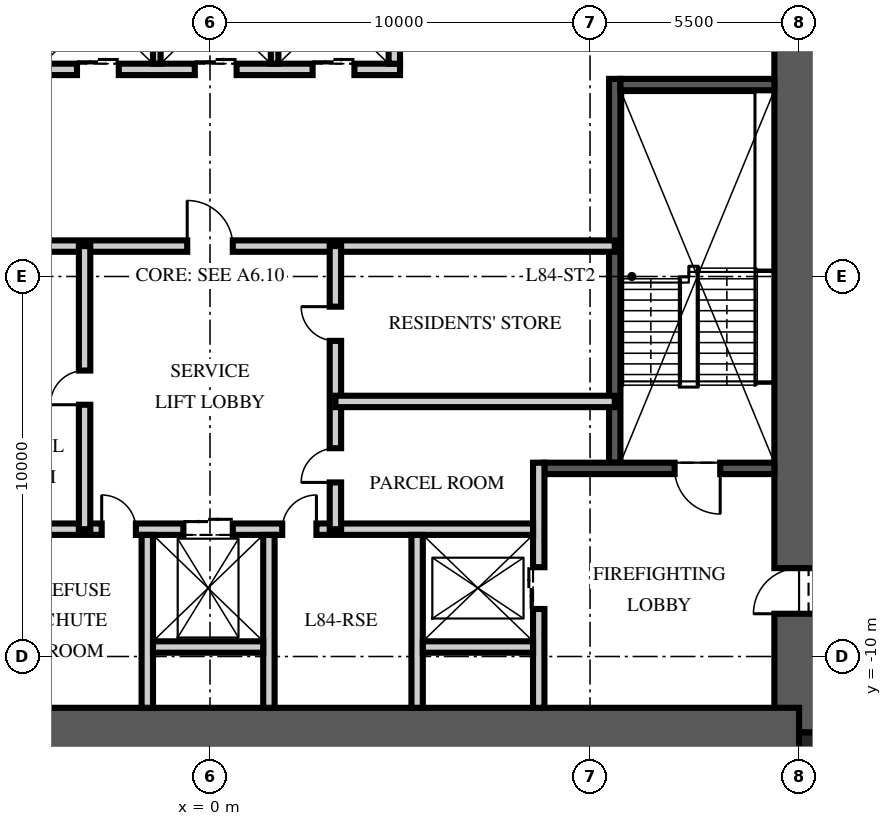
"""IFC4 building model, lengths in metres.
Left out: names, types, materials, properties, quantities, classifications, styles, units other than length and angle.
Written with IfcOpenShell. Run it as: python <this file> out.ifc"""

import sys

from ifc_helpers import new_model, si_unit, direction, frame, frame_2d, origin, origin_2d, place, context, subcontext, project, spatial, rectangle, extrude, element, fill, save


model = new_model("IFC4")
c1 = context("Model", 3, precision=1e-05, world=origin(), true_north=direction((0.0, 1.0)))
c2 = subcontext(c1, "Body", "Model", "MODEL_VIEW")
j1 = project(units=[si_unit("LENGTHUNIT", "METRE"), si_unit("PLANEANGLEUNIT", "RADIAN")], contexts=[c1])
p1 = place(None, origin())
s1 = spatial("IfcSite", under=j1, at=p1, CompositionType="ELEMENT")
p2 = place(p1, origin())
s2 = spatial("IfcBuilding", under=s1, at=p2, CompositionType="ELEMENT")
p3 = place(p2, frame((0.0, 0.0, 334.5)))
s3 = spatial("IfcBuildingStorey", under=s2, at=p3, CompositionType="ELEMENT", Elevation=334.5)
p4 = place(p3, frame((15.5, -12.0, -0.25), z_axis=(0.0, 0.0, 1.0), x_axis=(0.0, 1.0, 0.0)))
e1 = element("IfcWall", 1, at=p4, inside=s3, PredefinedType="SHEAR", context=c2, shape_type="SweptSolid", body=[
    extrude(rectangle(XDim=24.0, YDim=1.3, at=frame_2d((12.0, 0.0))), origin(), (0.0, 0.0, 1.0), 3.75),
])
p5 = place(p4, frame((3.125, 0.0, 0.25)))
e2 = element("IfcOpeningElement", 2, at=p5, cuts=e1, PredefinedType="OPENING", context=c2, shape_type="SweptSolid", body=[
    extrude(rectangle(XDim=1.2, YDim=2.1, at=frame_2d((0.6, 1.05))), frame((0.0, 0.66, 0.0), z_axis=(0.0, -1.0, 0.0), x_axis=(1.0, 0.0, 0.0)), (0.0, 0.0, 1.0), 1.32),
])
p6 = place(p4, frame((19.375, 0.0, 0.25)))
e3 = element("IfcOpeningElement", 3, at=p6, cuts=e1, PredefinedType="OPENING", context=c2, shape_type="SweptSolid", body=[
    extrude(rectangle(XDim=1.8, YDim=2.1, at=frame_2d((0.9, 1.05))), frame((0.0, 0.66, 0.0), z_axis=(0.0, -1.0, 0.0), x_axis=(1.0, 0.0, 0.0)), (0.0, 0.0, 1.0), 1.32),
])
p7 = place(p3, frame((-15.5, -12.0, -0.25), z_axis=(0.0, 0.0, 1.0), x_axis=(1.0, 0.0, 0.0)))
e4 = element("IfcWall", 4, at=p7, inside=s3, PredefinedType="SHEAR", context=c2, shape_type="SweptSolid", body=[
    extrude(rectangle(XDim=31.0, YDim=1.3, at=frame_2d((15.5, 0.0))), origin(), (0.0, 0.0, 1.0), 3.75),
])
p8 = place(p3, frame((15.825, -12.325, -0.25), z_axis=(0.0, 0.0, 1.0), x_axis=(1.0, 0.0, 0.0)))
e5 = element("IfcColumn", 5, at=p8, inside=s3, PredefinedType="COLUMN", context=c2, shape_type="SweptSolid", body=[
    extrude(rectangle(XDim=0.65, YDim=0.65, at=origin_2d()), origin(), (0.0, 0.0, 1.0), 3.75),
])
p9 = place(p3, frame((10.65, -4.9, 0.0), z_axis=(0.0, 0.0, 1.0), x_axis=(0.0, 1.0, 0.0)))
e6 = element("IfcWall", 6, at=p9, inside=s3, PredefinedType="SOLIDWALL", context=c2, shape_type="SweptSolid", body=[
    extrude(rectangle(XDim=10.1, YDim=0.3, at=frame_2d((5.05, 0.0))), origin(), (0.0, 0.0, 1.0), 3.5),
])
p10 = place(p3, frame((14.85, -5.05, 0.0), z_axis=(0.0, 0.0, 1.0), x_axis=(-1.0, 0.0, 0.0)))
e7 = element("IfcWall", 7, at=p10, inside=s3, PredefinedType="SOLIDWALL", context=c2, shape_type="SweptSolid", body=[
    extrude(rectangle(XDim=6.05, YDim=0.3, at=frame_2d((3.025, 0.0))), origin(), (0.0, 0.0, 1.0), 3.5),
])
p11 = place(p10, frame((1.425, 0.0, 0.0)))
e8 = element("IfcOpeningElement", 8, at=p11, cuts=e7, PredefinedType="OPENING", context=c2, shape_type="SweptSolid", body=[
    extrude(rectangle(XDim=1.2, YDim=2.1, at=frame_2d((0.6, 1.05))), frame((0.0, 0.16, 0.0), z_axis=(0.0, -1.0, 0.0), x_axis=(1.0, 0.0, 0.0)), (0.0, 0.0, 1.0), 0.32),
])
p12 = place(p3, frame((14.85, 5.05, 0.0), z_axis=(0.0, 0.0, 1.0), x_axis=(-1.0, 0.0, 0.0)))
e9 = element("IfcWall", 9, at=p12, inside=s3, PredefinedType="SOLIDWALL", context=c2, shape_type="SweptSolid", body=[
    extrude(rectangle(XDim=4.05, YDim=0.3, at=frame_2d((2.025, 0.0))), origin(), (0.0, 0.0, 1.0), 3.5),
])
p13 = place(p3, frame((8.65, -11.35, 0.0), z_axis=(0.0, 0.0, 1.0), x_axis=(0.0, 1.0, 0.0)))
e10 = element("IfcWall", 10, at=p13, inside=s3, PredefinedType="PARTITIONING", context=c2, shape_type="SweptSolid", body=[
    extrude(rectangle(XDim=6.45, YDim=0.3, at=frame_2d((3.225, 0.0))), origin(), (0.0, 0.0, 1.0), 3.5),
])
p14 = place(p13, frame((2.6, 0.0, 0.0)))
e11 = element("IfcOpeningElement", 11, at=p14, cuts=e10, PredefinedType="OPENING", context=c2, shape_type="SweptSolid", body=[
    extrude(rectangle(XDim=1.1, YDim=2.1, at=frame_2d((0.55, 1.05))), frame((0.0, 0.16, 0.0), z_axis=(0.0, -1.0, 0.0), x_axis=(1.0, 0.0, 0.0)), (0.0, 0.0, 1.0), 0.32),
])
p15 = place(p3, frame((-8.5, -6.65, 0.0), z_axis=(0.0, 0.0, 1.0), x_axis=(1.0, 0.0, 0.0)))
e12 = element("IfcWall", 12, at=p15, inside=s3, PredefinedType="PARTITIONING", context=c2, shape_type="SweptSolid", body=[
    extrude(rectangle(XDim=17.0, YDim=0.3, at=frame_2d((8.5, 0.0))), origin(), (0.0, 0.0, 1.0), 3.5),
])
p16 = place(p15, frame((7.8, 0.0, 0.0)))
e13 = element("IfcOpeningElement", 13, at=p16, cuts=e12, PredefinedType="OPENING", context=c2, shape_type="SweptSolid", body=[
    extrude(rectangle(XDim=1.3, YDim=2.4, at=frame_2d((0.65, 1.2))), frame((0.0, 0.16, 0.0), z_axis=(0.0, -1.0, 0.0), x_axis=(1.0, 0.0, 0.0)), (0.0, 0.0, 1.0), 0.32),
])
p17 = place(p15, frame((5.65, 0.0, 0.0)))
e14 = element("IfcOpeningElement", 14, at=p17, cuts=e12, PredefinedType="OPENING", context=c2, shape_type="SweptSolid", body=[
    extrude(rectangle(XDim=0.9, YDim=2.1, at=frame_2d((0.45, 1.05))), frame((0.0, 0.16, 0.0), z_axis=(0.0, -1.0, 0.0), x_axis=(1.0, 0.0, 0.0)), (0.0, 0.0, 1.0), 0.32),
])
p18 = place(p15, frame((10.4, 0.0, 0.0)))
e15 = element("IfcOpeningElement", 15, at=p18, cuts=e12, PredefinedType="OPENING", context=c2, shape_type="SweptSolid", body=[
    extrude(rectangle(XDim=0.9, YDim=2.1, at=frame_2d((0.45, 1.05))), frame((0.0, 0.16, 0.0), z_axis=(0.0, -1.0, 0.0), x_axis=(1.0, 0.0, 0.0)), (0.0, 0.0, 1.0), 0.32),
])
for number, where, z_axis, x_axis in (
    (16, (-1.65, -11.35, 0.0), (0.0, 0.0, 1.0), (0.0, 1.0, 0.0)),
    (17, (1.55, -11.35, 0.0), (0.0, 0.0, 1.0), (0.0, 1.0, 0.0)),
    (18, (5.45, -11.35, 0.0), (0.0, 0.0, 1.0), (0.0, 1.0, 0.0)),
):
    element("IfcWall", number, at=place(p3, frame(where, z_axis=z_axis, x_axis=x_axis)), inside=s3, PredefinedType="PARTITIONING", context=c2, shape_type="SweptSolid", body=[
        extrude(rectangle(XDim=4.55, YDim=0.3, at=frame_2d((2.275, 0.0))), origin(), (0.0, 0.0, 1.0), 3.5),
    ])
for number, where, z_axis, x_axis in (
    (19, (-1.5, -9.75, 0.0), (0.0, 0.0, 1.0), (1.0, 0.0, 0.0)),
    (20, (5.6, -9.75, 0.0), (0.0, 0.0, 1.0), (1.0, 0.0, 0.0)),
):
    element("IfcWall", number, at=place(p3, frame(where, z_axis=z_axis, x_axis=x_axis)), inside=s3, PredefinedType="PARTITIONING", context=c2, shape_type="SweptSolid", body=[
        extrude(rectangle(XDim=2.9, YDim=0.3, at=frame_2d((1.45, 0.0))), origin(), (0.0, 0.0, 1.0), 3.5),
    ])
p19 = place(p3, frame((-4.7, 5.45, 0.0), z_axis=(0.0, 0.0, 1.0), x_axis=(1.0, 0.0, 0.0)))
e21 = element("IfcWall", 21, at=p19, inside=s3, PredefinedType="PARTITIONING", context=c2, shape_type="SweptSolid", body=[
    extrude(rectangle(XDim=9.7, YDim=0.3, at=frame_2d((4.85, 0.0))), origin(), (0.0, 0.0, 1.0), 3.5),
])
p20 = place(p19, frame((1.2, 0.0, 0.0)))
e22 = element("IfcOpeningElement", 22, at=p20, cuts=e21, PredefinedType="OPENING", context=c2, shape_type="SweptSolid", body=[
    extrude(rectangle(XDim=1.1, YDim=2.1, at=frame_2d((0.55, 1.05))), frame((0.0, 0.16, 0.0), z_axis=(0.0, -1.0, 0.0), x_axis=(1.0, 0.0, 0.0)), (0.0, 0.0, 1.0), 0.32),
])
p21 = place(p19, frame((4.3, 0.0, 0.0)))
e23 = element("IfcOpeningElement", 23, at=p21, cuts=e21, PredefinedType="OPENING", context=c2, shape_type="SweptSolid", body=[
    extrude(rectangle(XDim=1.1, YDim=2.1, at=frame_2d((0.55, 1.05))), frame((0.0, 0.16, 0.0), z_axis=(0.0, -1.0, 0.0), x_axis=(1.0, 0.0, 0.0)), (0.0, 0.0, 1.0), 0.32),
])
p22 = place(p19, frame((7.4, 0.0, 0.0)))
e24 = element("IfcOpeningElement", 24, at=p22, cuts=e21, PredefinedType="OPENING", context=c2, shape_type="SweptSolid", body=[
    extrude(rectangle(XDim=1.1, YDim=2.1, at=frame_2d((0.55, 1.05))), frame((0.0, 0.16, 0.0), z_axis=(0.0, -1.0, 0.0), x_axis=(1.0, 0.0, 0.0)), (0.0, 0.0, 1.0), 0.32),
])
p23 = place(p3, frame((4.85, 5.6, 0.0), z_axis=(0.0, 0.0, 1.0), x_axis=(0.0, 1.0, 0.0)))
e25 = element("IfcWall", 25, at=p23, inside=s3, PredefinedType="PARTITIONING", context=c2, shape_type="SweptSolid", body=[
    extrude(rectangle(XDim=2.8, YDim=0.3, at=frame_2d((1.4, 0.0))), origin(), (0.0, 0.0, 1.0), 3.5),
])
for number, where, z_axis, x_axis in (
    (26, (-1.4, 5.6, 0.0), (0.0, 0.0, 1.0), (0.0, 1.0, 0.0)),
    (27, (1.7, 5.6, 0.0), (0.0, 0.0, 1.0), (0.0, 1.0, 0.0)),
):
    element("IfcWall", number, at=place(p3, frame(where, z_axis=z_axis, x_axis=x_axis)), inside=s3, PredefinedType="PARTITIONING", context=c2, shape_type="SweptSolid", body=[
        extrude(rectangle(XDim=2.8, YDim=0.2, at=frame_2d((1.4, 0.0))), origin(), (0.0, 0.0, 1.0), 3.5),
    ])
p24 = place(p3, frame((-10.65, 0.8, 0.0), z_axis=(0.0, 0.0, 1.0), x_axis=(1.0, 0.0, 0.0)))
e28 = element("IfcWall", 28, at=p24, inside=s3, PredefinedType="PARTITIONING", context=c2, shape_type="SweptSolid", body=[
    extrude(rectangle(XDim=21.3, YDim=0.3, at=frame_2d((10.65, 0.0))), origin(), (0.0, 0.0, 1.0), 3.5),
])
p25 = place(p24, frame((10.05, 0.0, 0.0)))
e29 = element("IfcOpeningElement", 29, at=p25, cuts=e28, PredefinedType="OPENING", context=c2, shape_type="SweptSolid", body=[
    extrude(rectangle(XDim=1.2, YDim=2.1, at=frame_2d((0.6, 1.05))), frame((0.0, 0.16, 0.0), z_axis=(0.0, -1.0, 0.0), x_axis=(1.0, 0.0, 0.0)), (0.0, 0.0, 1.0), 0.32),
])
p26 = place(p24, frame((1.74, 0.0, 0.0)))
e30 = element("IfcOpeningElement", 30, at=p26, cuts=e28, PredefinedType="OPENING", context=c2, shape_type="SweptSolid", body=[
    extrude(rectangle(XDim=0.9, YDim=2.1, at=frame_2d((0.45, 1.05))), frame((0.0, 0.16, 0.0), z_axis=(0.0, -1.0, 0.0), x_axis=(1.0, 0.0, 0.0)), (0.0, 0.0, 1.0), 0.32),
])
p27 = place(p3, frame((-3.3, -6.65, 0.0), z_axis=(0.0, 0.0, 1.0), x_axis=(0.0, 1.0, 0.0)))
e31 = element("IfcWall", 31, at=p27, inside=s3, PredefinedType="PARTITIONING", context=c2, shape_type="SweptSolid", body=[
    extrude(rectangle(XDim=7.45, YDim=0.3, at=frame_2d((3.725, 0.0))), origin(), (0.0, 0.0, 1.0), 3.5),
])
p28 = place(p27, frame((3.275, 0.0, 0.0)))
e32 = element("IfcOpeningElement", 32, at=p28, cuts=e31, PredefinedType="OPENING", context=c2, shape_type="SweptSolid", body=[
    extrude(rectangle(XDim=0.9, YDim=2.1, at=frame_2d((0.45, 1.05))), frame((0.0, 0.16, 0.0), z_axis=(0.0, -1.0, 0.0), x_axis=(1.0, 0.0, 0.0)), (0.0, 0.0, 1.0), 0.32),
])
p29 = place(p3, frame((3.3, -6.65, 0.0), z_axis=(0.0, 0.0, 1.0), x_axis=(0.0, 1.0, 0.0)))
e33 = element("IfcWall", 33, at=p29, inside=s3, PredefinedType="PARTITIONING", context=c2, shape_type="SweptSolid", body=[
    extrude(rectangle(XDim=7.45, YDim=0.3, at=frame_2d((3.725, 0.0))), origin(), (0.0, 0.0, 1.0), 3.5),
])
p30 = place(p29, frame((1.231, 0.0, 0.0)))
e34 = element("IfcOpeningElement", 34, at=p30, cuts=e33, PredefinedType="OPENING", context=c2, shape_type="SweptSolid", body=[
    extrude(rectangle(XDim=0.9, YDim=2.1, at=frame_2d((0.45, 1.05))), frame((0.0, 0.16, 0.0), z_axis=(0.0, -1.0, 0.0), x_axis=(1.0, 0.0, 0.0)), (0.0, 0.0, 1.0), 0.32),
])
p31 = place(p29, frame((4.956, 0.0, 0.0)))
e35 = element("IfcOpeningElement", 35, at=p31, cuts=e33, PredefinedType="OPENING", context=c2, shape_type="SweptSolid", body=[
    extrude(rectangle(XDim=0.9, YDim=2.1, at=frame_2d((0.45, 1.05))), frame((0.0, 0.16, 0.0), z_axis=(0.0, -1.0, 0.0), x_axis=(1.0, 0.0, 0.0)), (0.0, 0.0, 1.0), 0.32),
])
p32 = place(p3, frame((10.65, -3.288, 0.0), z_axis=(0.0, 0.0, 1.0), x_axis=(-1.0, 0.0, 0.0)))
e36 = element("IfcWall", 36, at=p32, inside=s3, PredefinedType="PARTITIONING", context=c2, shape_type="SweptSolid", body=[
    extrude(rectangle(XDim=7.35, YDim=0.3, at=frame_2d((3.675, 0.0))), origin(), (0.0, 0.0, 1.0), 3.5),
])
p33 = place(p11, origin())
e37 = element("IfcDoor", 37, at=p33, inside=s3, OperationType="SINGLE_SWING_LEFT", PredefinedType="DOOR", context=c2, shape_type="SweptSolid", body=[
    extrude(rectangle(XDim=1.2, YDim=2.1, at=frame_2d((0.6, 1.05))), frame((0.0, 0.025, 0.0), z_axis=(0.0, -1.0, 0.0), x_axis=(1.0, 0.0, 0.0)), (0.0, 0.0, 1.0), 0.05),
])
fill(e8, e37)
p34 = place(p5, origin())
e38 = element("IfcDoor", 38, at=p34, inside=s3, OperationType="SINGLE_SWING_LEFT", PredefinedType="DOOR", context=c2, shape_type="SweptSolid", body=[
    extrude(rectangle(XDim=1.2, YDim=2.1, at=frame_2d((0.6, 1.05))), frame((0.0, 0.025, 0.0), z_axis=(0.0, -1.0, 0.0), x_axis=(1.0, 0.0, 0.0)), (0.0, 0.0, 1.0), 0.05),
])
fill(e2, e38)
p35 = place(p14, origin())
e39 = element("IfcDoor", 39, at=p35, inside=s3, OperationType="DOUBLE_DOOR_SLIDING", PredefinedType="DOOR", context=c2, shape_type="SweptSolid", body=[
    extrude(rectangle(XDim=1.1, YDim=2.1, at=frame_2d((0.55, 1.05))), frame((0.0, 0.025, 0.0), z_axis=(0.0, -1.0, 0.0), x_axis=(1.0, 0.0, 0.0)), (0.0, 0.0, 1.0), 0.05),
])
fill(e11, e39)
p36 = place(p20, origin())
e40 = element("IfcDoor", 40, at=p36, inside=s3, OperationType="DOUBLE_DOOR_SLIDING", PredefinedType="DOOR", context=c2, shape_type="SweptSolid", body=[
    extrude(rectangle(XDim=1.1, YDim=2.1, at=frame_2d((0.55, 1.05))), frame((0.0, 0.025, 0.0), z_axis=(0.0, -1.0, 0.0), x_axis=(1.0, 0.0, 0.0)), (0.0, 0.0, 1.0), 0.05),
])
fill(e22, e40)
p37 = place(p21, origin())
e41 = element("IfcDoor", 41, at=p37, inside=s3, OperationType="DOUBLE_DOOR_SLIDING", PredefinedType="DOOR", context=c2, shape_type="SweptSolid", body=[
    extrude(rectangle(XDim=1.1, YDim=2.1, at=frame_2d((0.55, 1.05))), frame((0.0, 0.025, 0.0), z_axis=(0.0, -1.0, 0.0), x_axis=(1.0, 0.0, 0.0)), (0.0, 0.0, 1.0), 0.05),
])
fill(e23, e41)
p38 = place(p22, origin())
e42 = element("IfcDoor", 42, at=p38, inside=s3, OperationType="DOUBLE_DOOR_SLIDING", PredefinedType="DOOR", context=c2, shape_type="SweptSolid", body=[
    extrude(rectangle(XDim=1.1, YDim=2.1, at=frame_2d((0.55, 1.05))), frame((0.0, 0.025, 0.0), z_axis=(0.0, -1.0, 0.0), x_axis=(1.0, 0.0, 0.0)), (0.0, 0.0, 1.0), 0.05),
])
fill(e24, e42)
p39 = place(p16, origin())
e43 = element("IfcDoor", 43, at=p39, inside=s3, OperationType="DOUBLE_DOOR_SLIDING", PredefinedType="DOOR", context=c2, shape_type="SweptSolid", body=[
    extrude(rectangle(XDim=1.3, YDim=2.4, at=frame_2d((0.65, 1.2))), frame((0.0, 0.025, 0.0), z_axis=(0.0, -1.0, 0.0), x_axis=(1.0, 0.0, 0.0)), (0.0, 0.0, 1.0), 0.05),
])
fill(e13, e43)
p40 = place(p25, origin())
e44 = element("IfcDoor", 44, at=p40, inside=s3, OperationType="SINGLE_SWING_LEFT", PredefinedType="DOOR", context=c2, shape_type="SweptSolid", body=[
    extrude(rectangle(XDim=1.2, YDim=2.1, at=frame_2d((0.6, 1.05))), frame((0.0, 0.025, 0.0), z_axis=(0.0, -1.0, 0.0), x_axis=(1.0, 0.0, 0.0)), (0.0, 0.0, 1.0), 0.05),
])
fill(e29, e44)
p41 = place(p17, origin())
e45 = element("IfcDoor", 45, at=p41, inside=s3, OperationType="SINGLE_SWING_LEFT", PredefinedType="DOOR", context=c2, shape_type="SweptSolid", body=[
    extrude(rectangle(XDim=0.9, YDim=2.1, at=frame_2d((0.45, 1.05))), frame((0.0, 0.025, 0.0), z_axis=(0.0, -1.0, 0.0), x_axis=(1.0, 0.0, 0.0)), (0.0, 0.0, 1.0), 0.05),
])
fill(e14, e45)
p42 = place(p18, origin())
e46 = element("IfcDoor", 46, at=p42, inside=s3, OperationType="SINGLE_SWING_RIGHT", PredefinedType="DOOR", context=c2, shape_type="SweptSolid", body=[
    extrude(rectangle(XDim=0.9, YDim=2.1, at=frame_2d((0.45, 1.05))), frame((0.0, 0.025, 0.0), z_axis=(0.0, -1.0, 0.0), x_axis=(1.0, 0.0, 0.0)), (0.0, 0.0, 1.0), 0.05),
])
fill(e15, e46)
p43 = place(p28, origin())
e47 = element("IfcDoor", 47, at=p43, inside=s3, OperationType="SINGLE_SWING_LEFT", PredefinedType="DOOR", context=c2, shape_type="SweptSolid", body=[
    extrude(rectangle(XDim=0.9, YDim=2.1, at=frame_2d((0.45, 1.05))), frame((0.0, 0.025, 0.0), z_axis=(0.0, -1.0, 0.0), x_axis=(1.0, 0.0, 0.0)), (0.0, 0.0, 1.0), 0.05),
])
fill(e32, e47)
p44 = place(p30, origin())
e48 = element("IfcDoor", 48, at=p44, inside=s3, OperationType="SINGLE_SWING_LEFT", PredefinedType="DOOR", context=c2, shape_type="SweptSolid", body=[
    extrude(rectangle(XDim=0.9, YDim=2.1, at=frame_2d((0.45, 1.05))), frame((0.0, 0.025, 0.0), z_axis=(0.0, -1.0, 0.0), x_axis=(1.0, 0.0, 0.0)), (0.0, 0.0, 1.0), 0.05),
])
fill(e34, e48)
p45 = place(p31, origin())
e49 = element("IfcDoor", 49, at=p45, inside=s3, OperationType="SINGLE_SWING_RIGHT", PredefinedType="DOOR", context=c2, shape_type="SweptSolid", body=[
    extrude(rectangle(XDim=0.9, YDim=2.1, at=frame_2d((0.45, 1.05))), frame((0.0, 0.025, 0.0), z_axis=(0.0, -1.0, 0.0), x_axis=(1.0, 0.0, 0.0)), (0.0, 0.0, 1.0), 0.05),
])
fill(e35, e49)
save(model, sys.argv[1])
